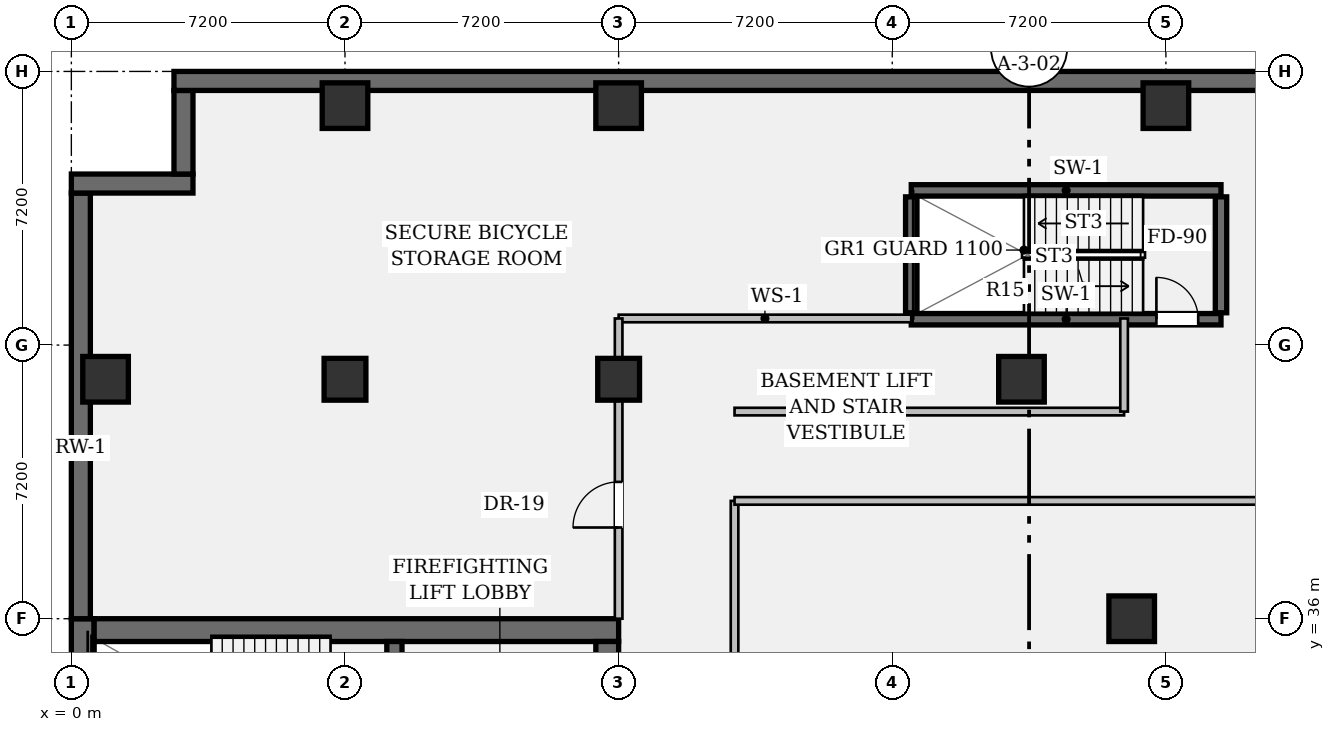
"""IFC4 building model, lengths in metres.
Left out: names, types, materials, properties, quantities, classifications, styles, units other than length and angle.
Written with IfcOpenShell. Run it as: python <this file> out.ifc"""

import sys

from ifc_helpers import new_model, si_unit, direction, frame, frame_2d, origin, origin_2d, place, context, subcontext, project, spatial, rectangle, hollow_rectangle, extrude, element, fill, save


model = new_model("IFC4")
c1 = context("Model", 3, precision=1e-05, world=origin(), true_north=direction((0.0, 1.0)))
c2 = subcontext(c1, "Body", "Model", "MODEL_VIEW")
j1 = project(units=[si_unit("LENGTHUNIT", "METRE"), si_unit("PLANEANGLEUNIT", "RADIAN")], contexts=[c1])
p1 = place(None, origin())
s1 = spatial("IfcSite", under=j1, at=p1, CompositionType="ELEMENT")
p2 = place(p1, origin())
s2 = spatial("IfcBuilding", under=s1, at=p2, CompositionType="ELEMENT")
p3 = place(p2, frame((0.0, 0.0, -4.55)))
s3 = spatial("IfcBuildingStorey", under=s2, at=p3, CompositionType="ELEMENT", Elevation=-4.55)
p4 = place(p3, frame((0.3, 7.2, 0.0), z_axis=(0.0, 0.0, 1.0), x_axis=(0.0, 1.0, 0.0)))
e1 = element("IfcWall", 1, at=p4, inside=s3, PredefinedType="SHEAR", context=c2, shape_type="SweptSolid", body=[
    extrude(rectangle(XDim=28.8, YDim=0.6, at=frame_2d((14.4, 0.0))), origin(), (0.0, 0.0, 1.0), 4.25),
])
p5 = place(p3, frame((0.6, 35.7, 0.0), z_axis=(0.0, 0.0, 1.0), x_axis=(1.0, 0.0, 0.0)))
e2 = element("IfcWall", 2, at=p5, inside=s3, PredefinedType="SHEAR", context=c2, shape_type="SweptSolid", body=[
    extrude(rectangle(XDim=13.8, YDim=0.6, at=frame_2d((6.9, 0.0))), origin(), (0.0, 0.0, 1.0), 4.25),
])
p6 = place(p3, frame((14.1, 35.4, 0.0), z_axis=(0.0, 0.0, 1.0), x_axis=(0.0, -1.0, 0.0)))
e3 = element("IfcWall", 3, at=p6, inside=s3, PredefinedType="SHEAR", context=c2, shape_type="SweptSolid", body=[
    extrude(rectangle(XDim=27.6, YDim=0.6, at=frame_2d((13.8, 0.0))), origin(), (0.0, 0.0, 1.0), 4.25),
])
p7 = place(p6, frame((1.3, 0.0, 0.0)))
e4 = element("IfcOpeningElement", 4, at=p7, cuts=e3, PredefinedType="OPENING", context=c2, shape_type="SweptSolid", body=[
    extrude(rectangle(XDim=1.2, YDim=2.15, at=frame_2d((0.6, 1.075))), frame((0.0, 0.312, 0.0), z_axis=(0.0, -1.0, 0.0), x_axis=(1.0, 0.0, 0.0)), (0.0, 0.0, 1.0), 0.624),
])
p8 = place(p6, frame((25.25, 0.0, 0.0)))
e5 = element("IfcOpeningElement", 5, at=p8, cuts=e3, PredefinedType="OPENING", context=c2, shape_type="SweptSolid", body=[
    extrude(rectangle(XDim=1.2, YDim=2.15, at=frame_2d((0.6, 1.075))), frame((0.0, 0.312, 0.0), z_axis=(0.0, -1.0, 0.0), x_axis=(1.0, 0.0, 0.0)), (0.0, 0.0, 1.0), 0.624),
])
p9 = place(p6, frame((14.6, 0.0, 0.0)))
e6 = element("IfcOpeningElement", 6, at=p9, cuts=e3, PredefinedType="OPENING", context=c2, shape_type="SweptSolid", body=[
    extrude(rectangle(XDim=1.6, YDim=2.2, at=frame_2d((0.8, 1.1))), frame((0.0, 0.312, 0.0), z_axis=(0.0, -1.0, 0.0), x_axis=(1.0, 0.0, 0.0)), (0.0, 0.0, 1.0), 0.624),
])
p10 = place(p3, frame((8.5, 31.72, 0.0), z_axis=(0.0, 0.0, 1.0), x_axis=(0.0, 1.0, 0.0)))
e7 = element("IfcWall", 7, at=p10, inside=s3, PredefinedType="SHEAR", context=c2, shape_type="SweptSolid", body=[
    extrude(rectangle(XDim=3.68, YDim=0.4, at=frame_2d((1.84, 0.0))), origin(), (0.0, 0.0, 1.0), 4.25),
])
p11 = place(p10, frame((0.9, 0.0, 0.0)))
e8 = element("IfcOpeningElement", 8, at=p11, cuts=e7, PredefinedType="OPENING", context=c2, shape_type="SweptSolid", body=[
    extrude(rectangle(XDim=1.1, YDim=2.15, at=frame_2d((0.55, 1.075))), frame((0.0, 0.212, 0.0), z_axis=(0.0, -1.0, 0.0), x_axis=(1.0, 0.0, 0.0)), (0.0, 0.0, 1.0), 0.424),
])
p12 = place(p3, frame((22.1, 43.88, 0.0), z_axis=(0.0, 0.0, 1.0), x_axis=(1.0, 0.0, 0.0)))
e9 = element("IfcWall", 9, at=p12, inside=s3, PredefinedType="SHEAR", context=c2, shape_type="SweptSolid", body=[
    extrude(rectangle(XDim=8.15, YDim=0.3, at=frame_2d((4.075, 0.0))), origin(), (0.0, 0.0, 1.0), 4.25),
])
p13 = place(p12, frame((6.45, 0.0, 0.0)))
e10 = element("IfcOpeningElement", 10, at=p13, cuts=e9, PredefinedType="OPENING", context=c2, shape_type="SweptSolid", body=[
    extrude(rectangle(XDim=1.1, YDim=2.15, at=frame_2d((0.55, 1.075))), frame((0.0, 0.162, 0.0), z_axis=(0.0, -1.0, 0.0), x_axis=(1.0, 0.0, 0.0)), (0.0, 0.0, 1.0), 0.324),
])
p14 = place(p3, frame((22.1, 47.27, 0.0), z_axis=(0.0, 0.0, 1.0), x_axis=(1.0, 0.0, 0.0)))
e11 = element("IfcWall", 11, at=p14, inside=s3, PredefinedType="SHEAR", context=c2, shape_type="SweptSolid", body=[
    extrude(rectangle(XDim=8.15, YDim=0.3, at=frame_2d((4.075, 0.0))), origin(), (0.0, 0.0, 1.0), 4.25),
])
for number, where, z_axis, x_axis in (
    (12, (22.1, 44.05, 0.0), (0.0, 0.0, 1.0), (0.0, 1.0, 0.0)),
    (13, (30.25, 44.05, 0.0), (0.0, 0.0, 1.0), (0.0, 1.0, 0.0)),
):
    element("IfcWall", number, at=place(p3, frame(where, z_axis=z_axis, x_axis=x_axis)), inside=s3, PredefinedType="SHEAR", context=c2, shape_type="SweptSolid", body=[
        extrude(rectangle(XDim=3.05, YDim=0.3, at=frame_2d((1.525, 0.0))), origin(), (0.0, 0.0, 1.0), 4.25),
    ])
p15 = place(p3, frame((0.25, 36.0, 0.0), z_axis=(0.0, 0.0, 1.0), x_axis=(0.0, 1.0, 0.0)))
e14 = element("IfcWall", 14, at=p15, inside=s3, PredefinedType="SOLIDWALL", context=c2, shape_type="SweptSolid", body=[
    extrude(rectangle(XDim=11.2, YDim=0.5, at=frame_2d((5.6, 0.0))), origin(), (0.0, 0.0, 1.0), 4.25),
])
p16 = place(p3, frame((0.0, 47.45, 0.0), z_axis=(0.0, 0.0, 1.0), x_axis=(1.0, 0.0, 0.0)))
e15 = element("IfcWall", 15, at=p16, inside=s3, PredefinedType="SOLIDWALL", context=c2, shape_type="SweptSolid", body=[
    extrude(rectangle(XDim=3.2, YDim=0.5, at=frame_2d((1.6, 0.0))), origin(), (0.0, 0.0, 1.0), 4.25),
])
p17 = place(p3, frame((2.95, 47.7, 0.0), z_axis=(0.0, 0.0, 1.0), x_axis=(0.0, 1.0, 0.0)))
e16 = element("IfcWall", 16, at=p17, inside=s3, PredefinedType="SOLIDWALL", context=c2, shape_type="SweptSolid", body=[
    extrude(rectangle(XDim=2.2, YDim=0.5, at=frame_2d((1.1, 0.0))), origin(), (0.0, 0.0, 1.0), 4.25),
])
p18 = place(p3, frame((2.7, 50.15, 0.0), z_axis=(0.0, 0.0, 1.0), x_axis=(1.0, 0.0, 0.0)))
e17 = element("IfcWall", 17, at=p18, inside=s3, PredefinedType="SOLIDWALL", context=c2, shape_type="SweptSolid", body=[
    extrude(rectangle(XDim=45.0, YDim=0.5, at=frame_2d((22.5, 0.0))), origin(), (0.0, 0.0, 1.0), 4.25),
])
p19 = place(p3, frame((0.9, 42.3, 0.0), z_axis=(0.0, 0.0, 1.0), x_axis=(1.0, 0.0, 0.0)))
e18 = element("IfcColumn", 18, at=p19, inside=s3, PredefinedType="COLUMN", context=c2, shape_type="SweptSolid", body=[
    extrude(hollow_rectangle(XDim=1.2, YDim=1.2, WallThickness=0.075, at=origin_2d()), origin(), (0.0, 0.0, 1.0), 4.25),
])
p20 = place(p3, frame((7.2, 42.3, 0.0), z_axis=(0.0, 0.0, 1.0), x_axis=(1.0, 0.0, 0.0)))
e19 = element("IfcColumn", 19, at=p20, inside=s3, PredefinedType="COLUMN", context=c2, shape_type="SweptSolid", body=[
    extrude(rectangle(XDim=1.1, YDim=1.1, at=origin_2d()), origin(), (0.0, 0.0, 1.0), 4.25),
])
p21 = place(p3, frame((7.2, 49.5, 0.0), z_axis=(0.0, 0.0, 1.0), x_axis=(1.0, 0.0, 0.0)))
e20 = element("IfcColumn", 20, at=p21, inside=s3, PredefinedType="COLUMN", context=c2, shape_type="SweptSolid", body=[
    extrude(hollow_rectangle(XDim=1.2, YDim=1.2, WallThickness=0.075, at=origin_2d()), origin(), (0.0, 0.0, 1.0), 4.25),
])
p22 = place(p3, frame((14.4, 42.3, 0.0), z_axis=(0.0, 0.0, 1.0), x_axis=(1.0, 0.0, 0.0)))
e21 = element("IfcColumn", 21, at=p22, inside=s3, PredefinedType="COLUMN", context=c2, shape_type="SweptSolid", body=[
    extrude(rectangle(XDim=1.1, YDim=1.1, at=origin_2d()), origin(), (0.0, 0.0, 1.0), 4.25),
])
for number, where, z_axis, x_axis in (
    (22, (14.4, 49.5, 0.0), (0.0, 0.0, 1.0), (1.0, 0.0, 0.0)),
    (23, (25.0, 42.3, 0.0), (0.0, 0.0, 1.0), (1.0, 0.0, 0.0)),
    (24, (27.9, 36.0, 0.0), (0.0, 0.0, 1.0), (1.0, 0.0, 0.0)),
    (25, (28.8, 49.5, 0.0), (0.0, 0.0, 1.0), (1.0, 0.0, 0.0)),
):
    element("IfcColumn", number, at=place(p3, frame(where, z_axis=z_axis, x_axis=x_axis)), inside=s3, PredefinedType="COLUMN", context=c2, shape_type="SweptSolid", body=[
        extrude(hollow_rectangle(XDim=1.2, YDim=1.2, WallThickness=0.075, at=origin_2d()), origin(), (0.0, 0.0, 1.0), 4.25),
    ])
p23 = place(p3, frame((17.45, 8.1, 0.0), z_axis=(0.0, 0.0, 1.0), x_axis=(0.0, 1.0, 0.0)))
e26 = element("IfcWall", 26, at=p23, inside=s3, PredefinedType="PARTITIONING", context=c2, shape_type="SweptSolid", body=[
    extrude(rectangle(XDim=31.0, YDim=0.2, at=frame_2d((15.5, 0.0))), origin(), (0.0, 0.0, 1.0), 3.288),
])
p24 = place(p23, frame((9.8, 0.0, 0.0)))
e27 = element("IfcOpeningElement", 27, at=p24, cuts=e26, PredefinedType="OPENING", context=c2, shape_type="SweptSolid", body=[
    extrude(rectangle(XDim=1.2, YDim=2.15, at=frame_2d((0.6, 1.075))), frame((0.0, 0.112, 0.0), z_axis=(0.0, -1.0, 0.0), x_axis=(1.0, 0.0, 0.0)), (0.0, 0.0, 1.0), 0.224),
])
p25 = place(p23, frame((23.6, 0.0, 0.0)))
e28 = element("IfcOpeningElement", 28, at=p25, cuts=e26, PredefinedType="OPENING", context=c2, shape_type="SweptSolid", body=[
    extrude(rectangle(XDim=1.2, YDim=2.15, at=frame_2d((0.6, 1.075))), frame((0.0, 0.112, 0.0), z_axis=(0.0, -1.0, 0.0), x_axis=(1.0, 0.0, 0.0)), (0.0, 0.0, 1.0), 0.224),
])
p26 = place(p3, frame((14.4, 43.9, 0.0), z_axis=(0.0, 0.0, 1.0), x_axis=(1.0, 0.0, 0.0)))
e29 = element("IfcWall", 29, at=p26, inside=s3, PredefinedType="PARTITIONING", context=c2, shape_type="SweptSolid", body=[
    extrude(rectangle(XDim=7.7, YDim=0.2, at=frame_2d((3.85, 0.0))), origin(), (0.0, 0.0, 1.0), 3.288),
])
p27 = place(p3, frame((17.45, 41.45, 0.0), z_axis=(0.0, 0.0, 1.0), x_axis=(1.0, 0.0, 0.0)))
e30 = element("IfcWall", 30, at=p27, inside=s3, PredefinedType="PARTITIONING", context=c2, shape_type="SweptSolid", body=[
    extrude(rectangle(XDim=10.25, YDim=0.2, at=frame_2d((5.125, 0.0))), origin(), (0.0, 0.0, 1.0), 3.686),
])
p28 = place(p3, frame((17.45, 39.1, 0.0), z_axis=(0.0, 0.0, 1.0), x_axis=(1.0, 0.0, 0.0)))
e31 = element("IfcWall", 31, at=p28, inside=s3, PredefinedType="PARTITIONING", context=c2, shape_type="SweptSolid", body=[
    extrude(rectangle(XDim=32.7, YDim=0.2, at=frame_2d((16.35, 0.0))), origin(), (0.0, 0.0, 1.0), 3.288),
])
p29 = place(p3, frame((27.7, 41.45, 0.0), z_axis=(0.0, 0.0, 1.0), x_axis=(0.0, 1.0, 0.0)))
e32 = element("IfcWall", 32, at=p29, inside=s3, PredefinedType="PARTITIONING", context=c2, shape_type="SweptSolid", body=[
    extrude(rectangle(XDim=2.45, YDim=0.2, at=frame_2d((1.225, 0.0))), origin(), (0.0, 0.0, 1.0), 3.288),
])
p30 = place(p3, frame((14.4, 36.0, 0.0), z_axis=(0.0, 0.0, 1.0), x_axis=(0.0, 1.0, 0.0)))
e33 = element("IfcWall", 33, at=p30, inside=s3, PredefinedType="PARTITIONING", context=c2, shape_type="SweptSolid", body=[
    extrude(rectangle(XDim=7.9, YDim=0.2, at=frame_2d((3.95, 0.0))), origin(), (0.0, 0.0, 1.0), 3.288),
])
p31 = place(p30, frame((2.4, 0.0, 0.0)))
e34 = element("IfcOpeningElement", 34, at=p31, cuts=e33, PredefinedType="OPENING", context=c2, shape_type="SweptSolid", body=[
    extrude(rectangle(XDim=1.2, YDim=2.15, at=frame_2d((0.6, 1.075))), frame((0.0, 0.112, 0.0), z_axis=(0.0, -1.0, 0.0), x_axis=(1.0, 0.0, 0.0)), (0.0, 0.0, 1.0), 0.224),
])
p32 = place(p13, origin())
e35 = element("IfcDoor", 35, at=p32, inside=s3, OperationType="SINGLE_SWING_LEFT", PredefinedType="DOOR", context=c2, shape_type="SweptSolid", body=[
    extrude(rectangle(XDim=1.1, YDim=2.15, at=frame_2d((0.55, 1.075))), frame((0.0, 0.025, 0.0), z_axis=(0.0, -1.0, 0.0), x_axis=(1.0, 0.0, 0.0)), (0.0, 0.0, 1.0), 0.05),
])
fill(e10, e35)
p33 = place(p31, origin())
e36 = element("IfcDoor", 36, at=p33, inside=s3, OperationType="SINGLE_SWING_LEFT", PredefinedType="DOOR", context=c2, shape_type="SweptSolid", body=[
    extrude(rectangle(XDim=1.2, YDim=2.15, at=frame_2d((0.6, 1.075))), frame((0.0, 0.025, 0.0), z_axis=(0.0, -1.0, 0.0), x_axis=(1.0, 0.0, 0.0)), (0.0, 0.0, 1.0), 0.05),
])
fill(e34, e36)
save(model, sys.argv[1])
